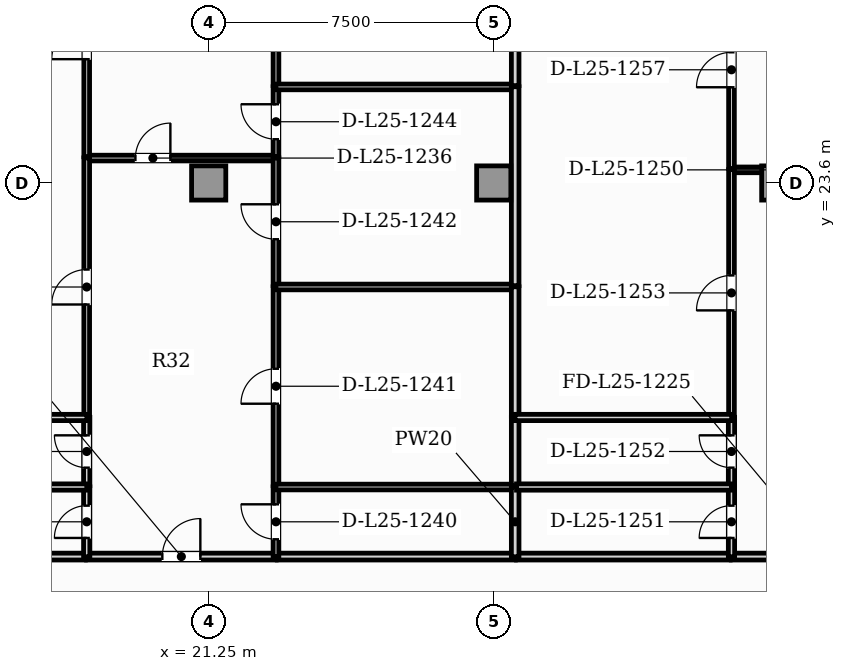
"""IFC4 building model, lengths in metres.
Left out: names, types, materials, properties, quantities, classifications, styles, units other than length and angle.
Written with IfcOpenShell. Run it as: python <this file> out.ifc"""

import sys

from ifc_helpers import new_model, si_unit, direction, frame, frame_2d, origin, origin_2d, place, context, subcontext, project, spatial, rectangle, extrude, element, fill, save


model = new_model("IFC4")
c1 = context("Model", 3, precision=1e-05, world=origin(), true_north=direction((0.0, 1.0)))
c2 = subcontext(c1, "Body", "Model", "MODEL_VIEW")
j1 = project(units=[si_unit("LENGTHUNIT", "METRE"), si_unit("PLANEANGLEUNIT", "RADIAN")], contexts=[c1])
p1 = place(None, origin())
s1 = spatial("IfcSite", under=j1, at=p1, CompositionType="ELEMENT")
p2 = place(p1, origin())
s2 = spatial("IfcBuilding", under=s1, at=p2, CompositionType="ELEMENT")
p3 = place(p2, frame((0.0, 0.0, 104.15)))
s3 = spatial("IfcBuildingStorey", under=s2, at=p3, CompositionType="ELEMENT", Elevation=104.15)
for number, where, z_axis, x_axis in (
    (1, (21.25, 23.6, 0.0), (0.0, 0.0, 1.0), (1.0, 0.0, 0.0)),
    (2, (28.75, 23.6, 0.0), (0.0, 0.0, 1.0), (1.0, 0.0, 0.0)),
    (3, (36.25, 23.6, 0.0), (0.0, 0.0, 1.0), (1.0, 0.0, 0.0)),
):
    element("IfcColumn", number, at=place(p3, frame(where, z_axis=z_axis, x_axis=x_axis)), inside=s3, PredefinedType="COLUMN", context=c2, shape_type="SweptSolid", body=[
        extrude(rectangle(XDim=0.9, YDim=0.9, at=origin_2d()), origin(), (0.0, 0.0, 1.0), 3.85),
    ])
p4 = place(p3, frame((18.035, 13.77, 0.0), z_axis=(0.0, 0.0, 1.0), x_axis=(1.0, 0.0, 0.0)))
e4 = element("IfcWall", 4, at=p4, inside=s3, PredefinedType="PARTITIONING", context=c2, shape_type="SweptSolid", body=[
    extrude(rectangle(XDim=4.99, YDim=0.18, at=frame_2d((2.495, 0.0))), origin(), (0.0, 0.0, 1.0), 3.6),
])
p5 = place(p4, frame((1.995, 0.0, 0.0)))
e5 = element("IfcOpeningElement", 5, at=p5, cuts=e4, PredefinedType="OPENING", context=c2, shape_type="SweptSolid", body=[
    extrude(rectangle(XDim=1.0, YDim=2.15, at=frame_2d((0.5, 1.075))), frame((0.0, 0.1, 0.0), z_axis=(0.0, -1.0, 0.0), x_axis=(1.0, 0.0, 0.0)), (0.0, 0.0, 1.0), 0.2),
])
p6 = place(p3, frame((11.885, 13.77, 0.0), z_axis=(0.0, 0.0, 1.0), x_axis=(1.0, 0.0, 0.0)))
e6 = element("IfcWall", 6, at=p6, inside=s3, PredefinedType="PARTITIONING", context=c2, shape_type="SweptSolid", body=[
    extrude(rectangle(XDim=6.12, YDim=0.18, at=frame_2d((3.06, 0.0))), origin(), (0.0, 0.0, 1.0), 3.6),
])
p7 = place(p3, frame((23.055, 13.77, 0.0), z_axis=(0.0, 0.0, 1.0), x_axis=(1.0, 0.0, 0.0)))
e7 = element("IfcWall", 7, at=p7, inside=s3, PredefinedType="PARTITIONING", context=c2, shape_type="SweptSolid", body=[
    extrude(rectangle(XDim=6.264, YDim=0.18, at=frame_2d((3.132, 0.0))), origin(), (0.0, 0.0, 1.0), 3.6),
])
p8 = place(p3, frame((35.0, 13.77, 0.0), z_axis=(0.0, 0.0, 1.0), x_axis=(1.0, 0.0, 0.0)))
e8 = element("IfcWall", 8, at=p8, inside=s3, PredefinedType="PARTITIONING", context=c2, shape_type="SweptSolid", body=[
    extrude(rectangle(XDim=4.99, YDim=0.18, at=frame_2d((2.495, 0.0))), origin(), (0.0, 0.0, 1.0), 3.6),
])
p9 = place(p8, frame((1.995, 0.0, 0.0)))
e9 = element("IfcOpeningElement", 9, at=p9, cuts=e8, PredefinedType="OPENING", context=c2, shape_type="SweptSolid", body=[
    extrude(rectangle(XDim=1.0, YDim=2.15, at=frame_2d((0.5, 1.075))), frame((0.0, 0.1, 0.0), z_axis=(0.0, -1.0, 0.0), x_axis=(1.0, 0.0, 0.0)), (0.0, 0.0, 1.0), 0.2),
])
p10 = place(p3, frame((29.349, 13.77, 0.0), z_axis=(0.0, 0.0, 1.0), x_axis=(1.0, 0.0, 0.0)))
e10 = element("IfcWall", 10, at=p10, inside=s3, PredefinedType="PARTITIONING", context=c2, shape_type="SweptSolid", body=[
    extrude(rectangle(XDim=5.622, YDim=0.18, at=frame_2d((2.811, 0.0))), origin(), (0.0, 0.0, 1.0), 3.6),
])
p11 = place(p3, frame((18.035, 24.256, 0.0), z_axis=(0.0, 0.0, 1.0), x_axis=(1.0, 0.0, 0.0)))
e11 = element("IfcWall", 11, at=p11, inside=s3, PredefinedType="PARTITIONING", context=c2, shape_type="SweptSolid", body=[
    extrude(rectangle(XDim=4.99, YDim=0.15, at=frame_2d((2.495, 0.0))), origin(), (0.0, 0.0, 1.0), 3.6),
])
p12 = place(p11, frame((1.287, 0.0, 0.0)))
e12 = element("IfcOpeningElement", 12, at=p12, cuts=e11, PredefinedType="OPENING", context=c2, shape_type="SweptSolid", body=[
    extrude(rectangle(XDim=0.92, YDim=2.1, at=frame_2d((0.46, 1.05))), frame((0.0, 0.085, 0.0), z_axis=(0.0, -1.0, 0.0), x_axis=(1.0, 0.0, 0.0)), (0.0, 0.0, 1.0), 0.17),
])
p13 = place(p3, frame((18.04, 13.765, 0.0), z_axis=(0.0, 0.0, 1.0), x_axis=(0.0, 1.0, 0.0)))
e13 = element("IfcWall", 13, at=p13, inside=s3, PredefinedType="PLUMBINGWALL", context=c2, shape_type="SweptSolid", body=[
    extrude(rectangle(XDim=1.84, YDim=0.165, at=frame_2d((0.92, 0.0))), origin(), (0.0, 0.0, 1.0), 3.6),
])
p14 = place(p13, frame((0.495, 0.0, 0.0)))
e14 = element("IfcOpeningElement", 14, at=p14, cuts=e13, PredefinedType="OPENING", context=c2, shape_type="SweptSolid", body=[
    extrude(rectangle(XDim=0.85, YDim=2.1, at=frame_2d((0.425, 1.05))), frame((0.0, 0.093, 0.0), z_axis=(0.0, -1.0, 0.0), x_axis=(1.0, 0.0, 0.0)), (0.0, 0.0, 1.0), 0.185),
])
p15 = place(p3, frame((18.04, 15.635, 0.0), z_axis=(0.0, 0.0, 1.0), x_axis=(0.0, 1.0, 0.0)))
e15 = element("IfcWall", 15, at=p15, inside=s3, PredefinedType="PLUMBINGWALL", context=c2, shape_type="SweptSolid", body=[
    extrude(rectangle(XDim=1.8, YDim=0.165, at=frame_2d((0.9, 0.0))), origin(), (0.0, 0.0, 1.0), 3.6),
])
p16 = place(p15, frame((0.475, 0.0, 0.0)))
e16 = element("IfcOpeningElement", 16, at=p16, cuts=e15, PredefinedType="OPENING", context=c2, shape_type="SweptSolid", body=[
    extrude(rectangle(XDim=0.85, YDim=2.1, at=frame_2d((0.425, 1.05))), frame((0.0, 0.093, 0.0), z_axis=(0.0, -1.0, 0.0), x_axis=(1.0, 0.0, 0.0)), (0.0, 0.0, 1.0), 0.185),
])
p17 = place(p3, frame((18.04, 17.465, 0.0), z_axis=(0.0, 0.0, 1.0), x_axis=(0.0, 1.0, 0.0)))
e17 = element("IfcWall", 17, at=p17, inside=s3, PredefinedType="PARTITIONING", context=c2, shape_type="SweptSolid", body=[
    extrude(rectangle(XDim=6.795, YDim=0.15, at=frame_2d((3.398, 0.0))), origin(), (0.0, 0.0, 1.0), 3.6),
])
p18 = place(p17, frame((2.938, 0.0, 0.0)))
e18 = element("IfcOpeningElement", 18, at=p18, cuts=e17, PredefinedType="OPENING", context=c2, shape_type="SweptSolid", body=[
    extrude(rectangle(XDim=0.92, YDim=2.1, at=frame_2d((0.46, 1.05))), frame((0.0, 0.085, 0.0), z_axis=(0.0, -1.0, 0.0), x_axis=(1.0, 0.0, 0.0)), (0.0, 0.0, 1.0), 0.17),
])
p19 = place(p3, frame((23.02, 13.765, 0.0), z_axis=(0.0, 0.0, 1.0), x_axis=(0.0, 1.0, 0.0)))
e19 = element("IfcWall", 19, at=p19, inside=s3, PredefinedType="PARTITIONING", context=c2, shape_type="SweptSolid", body=[
    extrude(rectangle(XDim=1.84, YDim=0.15, at=frame_2d((0.92, 0.0))), origin(), (0.0, 0.0, 1.0), 3.6),
])
p20 = place(p19, frame((0.46, 0.0, 0.0)))
e20 = element("IfcOpeningElement", 20, at=p20, cuts=e19, PredefinedType="OPENING", context=c2, shape_type="SweptSolid", body=[
    extrude(rectangle(XDim=0.92, YDim=2.1, at=frame_2d((0.46, 1.05))), frame((0.0, 0.085, 0.0), z_axis=(0.0, -1.0, 0.0), x_axis=(1.0, 0.0, 0.0)), (0.0, 0.0, 1.0), 0.17),
])
p21 = place(p3, frame((23.02, 15.635, 0.0), z_axis=(0.0, 0.0, 1.0), x_axis=(0.0, 1.0, 0.0)))
e21 = element("IfcWall", 21, at=p21, inside=s3, PredefinedType="PARTITIONING", context=c2, shape_type="SweptSolid", body=[
    extrude(rectangle(XDim=5.234, YDim=0.15, at=frame_2d((2.617, 0.0))), origin(), (0.0, 0.0, 1.0), 3.6),
])
p22 = place(p21, frame((2.157, 0.0, 0.0)))
e22 = element("IfcOpeningElement", 22, at=p22, cuts=e21, PredefinedType="OPENING", context=c2, shape_type="SweptSolid", body=[
    extrude(rectangle(XDim=0.92, YDim=2.1, at=frame_2d((0.46, 1.05))), frame((0.0, 0.085, 0.0), z_axis=(0.0, -1.0, 0.0), x_axis=(1.0, 0.0, 0.0)), (0.0, 0.0, 1.0), 0.17),
])
p23 = place(p3, frame((23.02, 20.899, 0.0), z_axis=(0.0, 0.0, 1.0), x_axis=(0.0, 1.0, 0.0)))
e23 = element("IfcWall", 23, at=p23, inside=s3, PredefinedType="PARTITIONING", context=c2, shape_type="SweptSolid", body=[
    extrude(rectangle(XDim=3.362, YDim=0.15, at=frame_2d((1.681, 0.0))), origin(), (0.0, 0.0, 1.0), 3.6),
])
p24 = place(p23, frame((1.221, 0.0, 0.0)))
e24 = element("IfcOpeningElement", 24, at=p24, cuts=e23, PredefinedType="OPENING", context=c2, shape_type="SweptSolid", body=[
    extrude(rectangle(XDim=0.92, YDim=2.1, at=frame_2d((0.46, 1.05))), frame((0.0, 0.085, 0.0), z_axis=(0.0, -1.0, 0.0), x_axis=(1.0, 0.0, 0.0)), (0.0, 0.0, 1.0), 0.17),
])
p25 = place(p3, frame((18.04, 24.291, 0.0), z_axis=(0.0, 0.0, 1.0), x_axis=(0.0, 1.0, 0.0)))
e25 = element("IfcWall", 25, at=p25, inside=s3, PredefinedType="PARTITIONING", context=c2, shape_type="SweptSolid", body=[
    extrude(rectangle(XDim=6.054, YDim=0.15, at=frame_2d((3.027, 0.0))), origin(), (0.0, 0.0, 1.0), 3.6),
])
p26 = place(p25, frame((2.567, 0.0, 0.0)))
e26 = element("IfcOpeningElement", 26, at=p26, cuts=e25, PredefinedType="OPENING", context=c2, shape_type="SweptSolid", body=[
    extrude(rectangle(XDim=0.92, YDim=2.1, at=frame_2d((0.46, 1.05))), frame((0.0, 0.085, 0.0), z_axis=(0.0, -1.0, 0.0), x_axis=(1.0, 0.0, 0.0)), (0.0, 0.0, 1.0), 0.17),
])
p27 = place(p3, frame((23.02, 24.291, 0.0), z_axis=(0.0, 0.0, 1.0), x_axis=(0.0, 1.0, 0.0)))
e27 = element("IfcWall", 27, at=p27, inside=s3, PredefinedType="PARTITIONING", context=c2, shape_type="SweptSolid", body=[
    extrude(rectangle(XDim=1.842, YDim=0.15, at=frame_2d((0.921, 0.0))), origin(), (0.0, 0.0, 1.0), 3.6),
])
p28 = place(p27, frame((0.461, 0.0, 0.0)))
e28 = element("IfcOpeningElement", 28, at=p28, cuts=e27, PredefinedType="OPENING", context=c2, shape_type="SweptSolid", body=[
    extrude(rectangle(XDim=0.92, YDim=2.1, at=frame_2d((0.46, 1.05))), frame((0.0, 0.085, 0.0), z_axis=(0.0, -1.0, 0.0), x_axis=(1.0, 0.0, 0.0)), (0.0, 0.0, 1.0), 0.17),
])
p29 = place(p3, frame((23.02, 26.162, 0.0), z_axis=(0.0, 0.0, 1.0), x_axis=(0.0, 1.0, 0.0)))
e29 = element("IfcWall", 29, at=p29, inside=s3, PredefinedType="PARTITIONING", context=c2, shape_type="SweptSolid", body=[
    extrude(rectangle(XDim=7.343, YDim=0.15, at=frame_2d((3.671, 0.0))), origin(), (0.0, 0.0, 1.0), 3.6),
])
p30 = place(p29, frame((3.211, 0.0, 0.0)))
e30 = element("IfcOpeningElement", 30, at=p30, cuts=e29, PredefinedType="OPENING", context=c2, shape_type="SweptSolid", body=[
    extrude(rectangle(XDim=0.92, YDim=2.1, at=frame_2d((0.46, 1.05))), frame((0.0, 0.085, 0.0), z_axis=(0.0, -1.0, 0.0), x_axis=(1.0, 0.0, 0.0)), (0.0, 0.0, 1.0), 0.17),
])
for number, where, z_axis, x_axis in (
    (31, (11.885, 15.6, 0.0), (0.0, 0.0, 1.0), (1.0, 0.0, 0.0)),
    (32, (11.885, 17.43, 0.0), (0.0, 0.0, 1.0), (1.0, 0.0, 0.0)),
):
    element("IfcWall", number, at=place(p3, frame(where, z_axis=z_axis, x_axis=x_axis)), inside=s3, PredefinedType="PLUMBINGWALL", context=c2, shape_type="SweptSolid", body=[
        extrude(rectangle(XDim=6.16, YDim=0.165, at=frame_2d((3.08, 0.0))), origin(), (0.0, 0.0, 1.0), 3.6),
    ])
p31 = place(p3, frame((23.015, 15.6, 0.0), z_axis=(0.0, 0.0, 1.0), x_axis=(1.0, 0.0, 0.0)))
e33 = element("IfcWall", 33, at=p31, inside=s3, PredefinedType="PARTITIONING", context=c2, shape_type="SweptSolid", body=[
    extrude(rectangle(XDim=6.304, YDim=0.15, at=frame_2d((3.152, 0.0))), origin(), (0.0, 0.0, 1.0), 3.6),
])
p32 = place(p3, frame((29.314, 13.765, 0.0), z_axis=(0.0, 0.0, 1.0), x_axis=(0.0, 1.0, 0.0)))
e34 = element("IfcWall", 34, at=p32, inside=s3, PredefinedType="PARTITIONING", context=c2, shape_type="SweptSolid", body=[
    extrude(rectangle(XDim=1.84, YDim=0.2, at=frame_2d((0.92, 0.0))), origin(), (0.0, 0.0, 1.0), 3.6),
])
p33 = place(p3, frame((23.015, 20.864, 0.0), z_axis=(0.0, 0.0, 1.0), x_axis=(1.0, 0.0, 0.0)))
e35 = element("IfcWall", 35, at=p33, inside=s3, PredefinedType="PARTITIONING", context=c2, shape_type="SweptSolid", body=[
    extrude(rectangle(XDim=6.304, YDim=0.15, at=frame_2d((3.152, 0.0))), origin(), (0.0, 0.0, 1.0), 3.6),
])
p34 = place(p3, frame((29.314, 15.635, 0.0), z_axis=(0.0, 0.0, 1.0), x_axis=(0.0, 1.0, 0.0)))
e36 = element("IfcWall", 36, at=p34, inside=s3, PredefinedType="PARTITIONING", context=c2, shape_type="SweptSolid", body=[
    extrude(rectangle(XDim=1.8, YDim=0.2, at=frame_2d((0.9, 0.0))), origin(), (0.0, 0.0, 1.0), 3.6),
])
p35 = place(p3, frame((29.314, 17.465, 0.0), z_axis=(0.0, 0.0, 1.0), x_axis=(0.0, 1.0, 0.0)))
e37 = element("IfcWall", 37, at=p35, inside=s3, PredefinedType="PARTITIONING", context=c2, shape_type="SweptSolid", body=[
    extrude(rectangle(XDim=3.404, YDim=0.2, at=frame_2d((1.702, 0.0))), origin(), (0.0, 0.0, 1.0), 3.6),
])
p36 = place(p3, frame((23.015, 26.127, 0.0), z_axis=(0.0, 0.0, 1.0), x_axis=(1.0, 0.0, 0.0)))
e38 = element("IfcWall", 38, at=p36, inside=s3, PredefinedType="PARTITIONING", context=c2, shape_type="SweptSolid", body=[
    extrude(rectangle(XDim=6.304, YDim=0.15, at=frame_2d((3.152, 0.0))), origin(), (0.0, 0.0, 1.0), 3.6),
])
p37 = place(p3, frame((29.314, 20.899, 0.0), z_axis=(0.0, 0.0, 1.0), x_axis=(0.0, 1.0, 0.0)))
e39 = element("IfcWall", 39, at=p37, inside=s3, PredefinedType="PARTITIONING", context=c2, shape_type="SweptSolid", body=[
    extrude(rectangle(XDim=5.234, YDim=0.2, at=frame_2d((2.617, 0.0))), origin(), (0.0, 0.0, 1.0), 3.6),
])
p38 = place(p3, frame((29.314, 26.162, 0.0), z_axis=(0.0, 0.0, 1.0), x_axis=(0.0, 1.0, 0.0)))
e40 = element("IfcWall", 40, at=p38, inside=s3, PredefinedType="PARTITIONING", context=c2, shape_type="SweptSolid", body=[
    extrude(rectangle(XDim=5.242, YDim=0.2, at=frame_2d((2.621, 0.0))), origin(), (0.0, 0.0, 1.0), 3.6),
])
p39 = place(p3, frame((35.0, 23.945, 0.0), z_axis=(0.0, 0.0, 1.0), x_axis=(1.0, 0.0, 0.0)))
e41 = element("IfcWall", 41, at=p39, inside=s3, PredefinedType="PARTITIONING", context=c2, shape_type="SweptSolid", body=[
    extrude(rectangle(XDim=4.99, YDim=0.15, at=frame_2d((2.495, 0.0))), origin(), (0.0, 0.0, 1.0), 3.6),
])
p40 = place(p39, frame((2.035, 0.0, 0.0)))
e42 = element("IfcOpeningElement", 42, at=p40, cuts=e41, PredefinedType="OPENING", context=c2, shape_type="SweptSolid", body=[
    extrude(rectangle(XDim=0.92, YDim=2.1, at=frame_2d((0.46, 1.05))), frame((0.0, 0.085, 0.0), z_axis=(0.0, -1.0, 0.0), x_axis=(1.0, 0.0, 0.0)), (0.0, 0.0, 1.0), 0.17),
])
p41 = place(p3, frame((35.006, 13.765, 0.0), z_axis=(0.0, 0.0, 1.0), x_axis=(0.0, 1.0, 0.0)))
e43 = element("IfcWall", 43, at=p41, inside=s3, PredefinedType="PLUMBINGWALL", context=c2, shape_type="SweptSolid", body=[
    extrude(rectangle(XDim=1.84, YDim=0.165, at=frame_2d((0.92, 0.0))), origin(), (0.0, 0.0, 1.0), 3.6),
])
p42 = place(p41, frame((0.495, 0.0, 0.0)))
e44 = element("IfcOpeningElement", 44, at=p42, cuts=e43, PredefinedType="OPENING", context=c2, shape_type="SweptSolid", body=[
    extrude(rectangle(XDim=0.85, YDim=2.1, at=frame_2d((0.425, 1.05))), frame((0.0, 0.093, 0.0), z_axis=(0.0, -1.0, 0.0), x_axis=(1.0, 0.0, 0.0)), (0.0, 0.0, 1.0), 0.185),
])
p43 = place(p3, frame((35.006, 15.635, 0.0), z_axis=(0.0, 0.0, 1.0), x_axis=(0.0, 1.0, 0.0)))
e45 = element("IfcWall", 45, at=p43, inside=s3, PredefinedType="PLUMBINGWALL", context=c2, shape_type="SweptSolid", body=[
    extrude(rectangle(XDim=1.8, YDim=0.165, at=frame_2d((0.9, 0.0))), origin(), (0.0, 0.0, 1.0), 3.6),
])
p44 = place(p43, frame((0.475, 0.0, 0.0)))
e46 = element("IfcOpeningElement", 46, at=p44, cuts=e45, PredefinedType="OPENING", context=c2, shape_type="SweptSolid", body=[
    extrude(rectangle(XDim=0.85, YDim=2.1, at=frame_2d((0.425, 1.05))), frame((0.0, 0.093, 0.0), z_axis=(0.0, -1.0, 0.0), x_axis=(1.0, 0.0, 0.0)), (0.0, 0.0, 1.0), 0.185),
])
p45 = place(p3, frame((35.006, 17.465, 0.0), z_axis=(0.0, 0.0, 1.0), x_axis=(0.0, 1.0, 0.0)))
e47 = element("IfcWall", 47, at=p45, inside=s3, PredefinedType="PARTITIONING", context=c2, shape_type="SweptSolid", body=[
    extrude(rectangle(XDim=6.485, YDim=0.15, at=frame_2d((3.243, 0.0))), origin(), (0.0, 0.0, 1.0), 3.6),
])
p46 = place(p45, frame((2.783, 0.0, 0.0)))
e48 = element("IfcOpeningElement", 48, at=p46, cuts=e47, PredefinedType="OPENING", context=c2, shape_type="SweptSolid", body=[
    extrude(rectangle(XDim=0.92, YDim=2.1, at=frame_2d((0.46, 1.05))), frame((0.0, 0.085, 0.0), z_axis=(0.0, -1.0, 0.0), x_axis=(1.0, 0.0, 0.0)), (0.0, 0.0, 1.0), 0.17),
])
p47 = place(p3, frame((35.006, 23.98, 0.0), z_axis=(0.0, 0.0, 1.0), x_axis=(0.0, 1.0, 0.0)))
e49 = element("IfcWall", 49, at=p47, inside=s3, PredefinedType="PARTITIONING", context=c2, shape_type="SweptSolid", body=[
    extrude(rectangle(XDim=7.424, YDim=0.15, at=frame_2d((3.712, 0.0))), origin(), (0.0, 0.0, 1.0), 3.6),
])
p48 = place(p47, frame((2.138, 0.0, 0.0)))
e50 = element("IfcOpeningElement", 50, at=p48, cuts=e49, PredefinedType="OPENING", context=c2, shape_type="SweptSolid", body=[
    extrude(rectangle(XDim=0.92, YDim=2.1, at=frame_2d((0.46, 1.05))), frame((0.0, 0.085, 0.0), z_axis=(0.0, -1.0, 0.0), x_axis=(1.0, 0.0, 0.0)), (0.0, 0.0, 1.0), 0.17),
])
p49 = place(p3, frame((29.349, 15.6, 0.0), z_axis=(0.0, 0.0, 1.0), x_axis=(1.0, 0.0, 0.0)))
e51 = element("IfcWall", 51, at=p49, inside=s3, PredefinedType="PLUMBINGWALL", context=c2, shape_type="SweptSolid", body=[
    extrude(rectangle(XDim=5.661, YDim=0.165, at=frame_2d((2.831, 0.0))), origin(), (0.0, 0.0, 1.0), 3.6),
])
p50 = place(p3, frame((29.309, 17.43, 0.0), z_axis=(0.0, 0.0, 1.0), x_axis=(1.0, 0.0, 0.0)))
e52 = element("IfcWall", 52, at=p50, inside=s3, PredefinedType="PLUMBINGWALL", context=c2, shape_type="SweptSolid", body=[
    extrude(rectangle(XDim=5.701, YDim=0.165, at=frame_2d((2.851, 0.0))), origin(), (0.0, 0.0, 1.0), 3.6),
])
p51 = place(p5, origin())
e53 = element("IfcDoor", 53, at=p51, inside=s3, OperationType="SINGLE_SWING_RIGHT", PredefinedType="DOOR", context=c2, shape_type="SweptSolid", body=[
    extrude(rectangle(XDim=1.0, YDim=2.15, at=frame_2d((0.5, 1.075))), frame((0.0, 0.025, 0.0), z_axis=(0.0, -1.0, 0.0), x_axis=(1.0, 0.0, 0.0)), (0.0, 0.0, 1.0), 0.05),
])
fill(e5, e53)
p52 = place(p12, origin())
e54 = element("IfcDoor", 54, at=p52, inside=s3, OperationType="SINGLE_SWING_RIGHT", PredefinedType="DOOR", context=c2, shape_type="SweptSolid", body=[
    extrude(rectangle(XDim=0.92, YDim=2.1, at=frame_2d((0.46, 1.05))), frame((0.0, 0.025, 0.0), z_axis=(0.0, -1.0, 0.0), x_axis=(1.0, 0.0, 0.0)), (0.0, 0.0, 1.0), 0.05),
])
fill(e12, e54)
p53 = place(p14, origin())
e55 = element("IfcDoor", 55, at=p53, inside=s3, OperationType="SINGLE_SWING_LEFT", PredefinedType="DOOR", context=c2, shape_type="SweptSolid", body=[
    extrude(rectangle(XDim=0.85, YDim=2.1, at=frame_2d((0.425, 1.05))), frame((0.0, 0.025, 0.0), z_axis=(0.0, -1.0, 0.0), x_axis=(1.0, 0.0, 0.0)), (0.0, 0.0, 1.0), 0.05),
])
fill(e14, e55)
p54 = place(p16, origin())
e56 = element("IfcDoor", 56, at=p54, inside=s3, OperationType="SINGLE_SWING_RIGHT", PredefinedType="DOOR", context=c2, shape_type="SweptSolid", body=[
    extrude(rectangle(XDim=0.85, YDim=2.1, at=frame_2d((0.425, 1.05))), frame((0.0, 0.025, 0.0), z_axis=(0.0, -1.0, 0.0), x_axis=(1.0, 0.0, 0.0)), (0.0, 0.0, 1.0), 0.05),
])
fill(e16, e56)
p55 = place(p18, origin())
e57 = element("IfcDoor", 57, at=p55, inside=s3, OperationType="SINGLE_SWING_LEFT", PredefinedType="DOOR", context=c2, shape_type="SweptSolid", body=[
    extrude(rectangle(XDim=0.92, YDim=2.1, at=frame_2d((0.46, 1.05))), frame((0.0, 0.025, 0.0), z_axis=(0.0, -1.0, 0.0), x_axis=(1.0, 0.0, 0.0)), (0.0, 0.0, 1.0), 0.05),
])
fill(e18, e57)
p56 = place(p20, origin())
e58 = element("IfcDoor", 58, at=p56, inside=s3, OperationType="SINGLE_SWING_RIGHT", PredefinedType="DOOR", context=c2, shape_type="SweptSolid", body=[
    extrude(rectangle(XDim=0.92, YDim=2.1, at=frame_2d((0.46, 1.05))), frame((0.0, 0.025, 0.0), z_axis=(0.0, -1.0, 0.0), x_axis=(1.0, 0.0, 0.0)), (0.0, 0.0, 1.0), 0.05),
])
fill(e20, e58)
p57 = place(p22, origin())
e59 = element("IfcDoor", 59, at=p57, inside=s3, OperationType="SINGLE_SWING_LEFT", PredefinedType="DOOR", context=c2, shape_type="SweptSolid", body=[
    extrude(rectangle(XDim=0.92, YDim=2.1, at=frame_2d((0.46, 1.05))), frame((0.0, 0.025, 0.0), z_axis=(0.0, -1.0, 0.0), x_axis=(1.0, 0.0, 0.0)), (0.0, 0.0, 1.0), 0.05),
])
fill(e22, e59)
p58 = place(p24, origin())
e60 = element("IfcDoor", 60, at=p58, inside=s3, OperationType="SINGLE_SWING_RIGHT", PredefinedType="DOOR", context=c2, shape_type="SweptSolid", body=[
    extrude(rectangle(XDim=0.92, YDim=2.1, at=frame_2d((0.46, 1.05))), frame((0.0, 0.025, 0.0), z_axis=(0.0, -1.0, 0.0), x_axis=(1.0, 0.0, 0.0)), (0.0, 0.0, 1.0), 0.05),
])
fill(e24, e60)
p59 = place(p26, origin())
e61 = element("IfcDoor", 61, at=p59, inside=s3, OperationType="SINGLE_SWING_LEFT", PredefinedType="DOOR", context=c2, shape_type="SweptSolid", body=[
    extrude(rectangle(XDim=0.92, YDim=2.1, at=frame_2d((0.46, 1.05))), frame((0.0, 0.025, 0.0), z_axis=(0.0, -1.0, 0.0), x_axis=(1.0, 0.0, 0.0)), (0.0, 0.0, 1.0), 0.05),
])
fill(e26, e61)
p60 = place(p28, origin())
e62 = element("IfcDoor", 62, at=p60, inside=s3, OperationType="SINGLE_SWING_RIGHT", PredefinedType="DOOR", context=c2, shape_type="SweptSolid", body=[
    extrude(rectangle(XDim=0.92, YDim=2.1, at=frame_2d((0.46, 1.05))), frame((0.0, 0.025, 0.0), z_axis=(0.0, -1.0, 0.0), x_axis=(1.0, 0.0, 0.0)), (0.0, 0.0, 1.0), 0.05),
])
fill(e28, e62)
p61 = place(p42, origin())
e63 = element("IfcDoor", 63, at=p61, inside=s3, OperationType="SINGLE_SWING_LEFT", PredefinedType="DOOR", context=c2, shape_type="SweptSolid", body=[
    extrude(rectangle(XDim=0.85, YDim=2.1, at=frame_2d((0.425, 1.05))), frame((0.0, 0.025, 0.0), z_axis=(0.0, -1.0, 0.0), x_axis=(1.0, 0.0, 0.0)), (0.0, 0.0, 1.0), 0.05),
])
fill(e44, e63)
p62 = place(p44, origin())
e64 = element("IfcDoor", 64, at=p62, inside=s3, OperationType="SINGLE_SWING_RIGHT", PredefinedType="DOOR", context=c2, shape_type="SweptSolid", body=[
    extrude(rectangle(XDim=0.85, YDim=2.1, at=frame_2d((0.425, 1.05))), frame((0.0, 0.025, 0.0), z_axis=(0.0, -1.0, 0.0), x_axis=(1.0, 0.0, 0.0)), (0.0, 0.0, 1.0), 0.05),
])
fill(e46, e64)
p63 = place(p46, origin())
e65 = element("IfcDoor", 65, at=p63, inside=s3, OperationType="SINGLE_SWING_LEFT", PredefinedType="DOOR", context=c2, shape_type="SweptSolid", body=[
    extrude(rectangle(XDim=0.92, YDim=2.1, at=frame_2d((0.46, 1.05))), frame((0.0, 0.025, 0.0), z_axis=(0.0, -1.0, 0.0), x_axis=(1.0, 0.0, 0.0)), (0.0, 0.0, 1.0), 0.05),
])
fill(e48, e65)
p64 = place(p48, origin())
e66 = element("IfcDoor", 66, at=p64, inside=s3, OperationType="SINGLE_SWING_LEFT", PredefinedType="DOOR", context=c2, shape_type="SweptSolid", body=[
    extrude(rectangle(XDim=0.92, YDim=2.1, at=frame_2d((0.46, 1.05))), frame((0.0, 0.025, 0.0), z_axis=(0.0, -1.0, 0.0), x_axis=(1.0, 0.0, 0.0)), (0.0, 0.0, 1.0), 0.05),
])
fill(e50, e66)
save(model, sys.argv[1])
